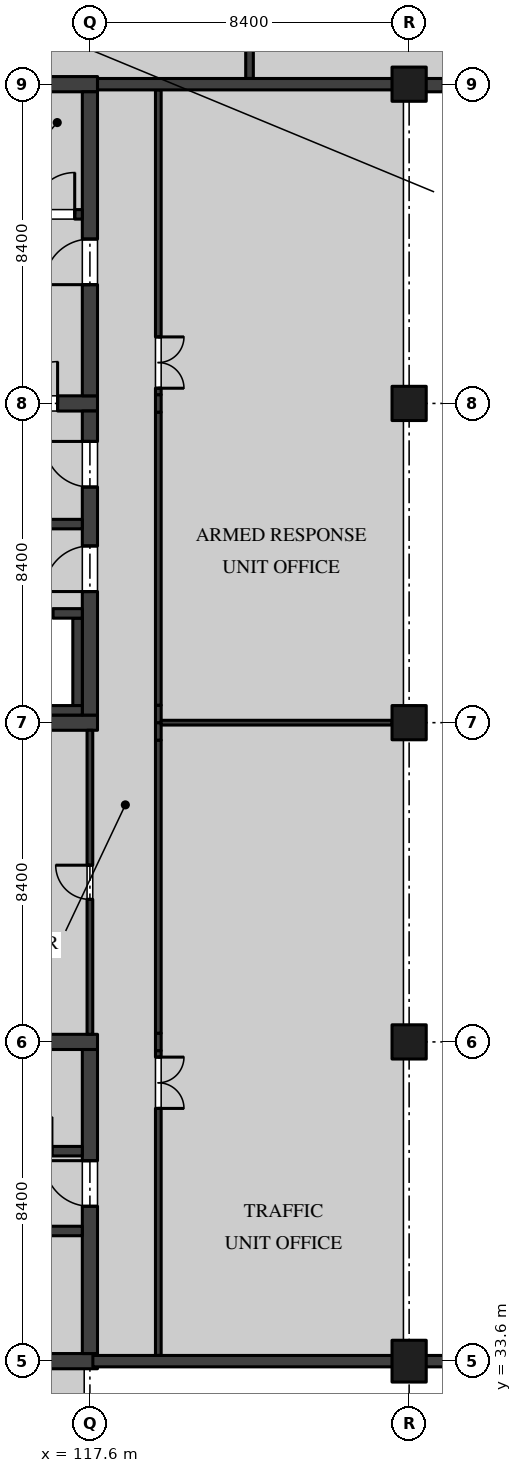
"""IFC4 building model, lengths in metres.
Left out: names, types, materials, properties, quantities, classifications, styles, units other than length and angle.
Written with IfcOpenShell. Run it as: python <this file> out.ifc"""

import sys

from ifc_helpers import new_model, si_unit, direction, frame, frame_2d, origin, origin_2d, place, context, subcontext, project, spatial, polyline, rectangle, outline, extrude, element, fill, save


model = new_model("IFC4")
c1 = context("Model", 3, precision=1e-05, world=origin(), true_north=direction((0.0, 1.0)))
c2 = subcontext(c1, "Body", "Model", "MODEL_VIEW")
j1 = project(units=[si_unit("LENGTHUNIT", "METRE"), si_unit("PLANEANGLEUNIT", "RADIAN")], contexts=[c1])
p1 = place(None, origin())
s1 = spatial("IfcSite", under=j1, at=p1, CompositionType="ELEMENT")
p2 = place(p1, origin())
s2 = spatial("IfcBuilding", under=s1, at=p2, CompositionType="ELEMENT")
p3 = place(p2, frame((0.0, 0.0, 5.4)))
s3 = spatial("IfcBuildingStorey", under=s2, at=p3, CompositionType="ELEMENT", Elevation=5.4)
p4 = place(p3, frame((126.0, 33.6, 0.0), z_axis=(0.0, 0.0, 1.0), x_axis=(1.0, 0.0, 0.0)))
e1 = element("IfcColumn", 1, at=p4, inside=s3, PredefinedType="COLUMN", context=c2, shape_type="SweptSolid", body=[
    extrude(rectangle(XDim=0.9, YDim=1.1, at=origin_2d()), origin(), (0.0, 0.0, 1.0), 4.37),
])
for number, where, z_axis, x_axis in (
    (2, (126.0, 42.0, 0.0), (0.0, 0.0, 1.0), (1.0, 0.0, 0.0)),
    (3, (126.0, 50.4, 0.0), (0.0, 0.0, 1.0), (1.0, 0.0, 0.0)),
    (4, (126.0, 58.8, 0.0), (0.0, 0.0, 1.0), (1.0, 0.0, 0.0)),
    (5, (126.0, 67.2, 0.0), (0.0, 0.0, 1.0), (1.0, 0.0, 0.0)),
):
    element("IfcColumn", number, at=place(p3, frame(where, z_axis=z_axis, x_axis=x_axis)), inside=s3, PredefinedType="COLUMN", context=c2, shape_type="SweptSolid", body=[
        extrude(rectangle(XDim=0.9, YDim=0.9, at=origin_2d()), origin(), (0.0, 0.0, 1.0), 4.37),
    ])
p5 = place(p3, frame((109.0, 50.4, 0.0), z_axis=(0.0, 0.0, 1.0), x_axis=(1.0, 0.0, 0.0)))
e6 = element("IfcWall", 6, at=p5, inside=s3, PredefinedType="SHEAR", context=c2, shape_type="SweptSolid", body=[
    extrude(rectangle(XDim=8.8, YDim=0.4, at=frame_2d((4.4, 0.0))), origin(), (0.0, 0.0, 1.0), 4.37),
])
p6 = place(p3, frame((109.0, 58.8, 0.0), z_axis=(0.0, 0.0, 1.0), x_axis=(1.0, 0.0, 0.0)))
e7 = element("IfcWall", 7, at=p6, inside=s3, PredefinedType="SHEAR", context=c2, shape_type="SweptSolid", body=[
    extrude(rectangle(XDim=8.8, YDim=0.4, at=frame_2d((4.4, 0.0))), origin(), (0.0, 0.0, 1.0), 4.37),
])
p7 = place(p6, frame((6.65, 0.0, 0.0)))
e8 = element("IfcOpeningElement", 8, at=p7, cuts=e7, PredefinedType="OPENING", context=c2, shape_type="SweptSolid", body=[
    extrude(rectangle(XDim=1.1, YDim=2.1, at=frame_2d((0.55, 1.05))), frame((0.0, 0.21, 0.0), z_axis=(0.0, -1.0, 0.0), x_axis=(1.0, 0.0, 0.0)), (0.0, 0.0, 1.0), 0.42),
])
p8 = place(p3, frame((117.6, 50.6, 0.0), z_axis=(0.0, 0.0, 1.0), x_axis=(0.0, 1.0, 0.0)))
e9 = element("IfcWall", 9, at=p8, inside=s3, PredefinedType="SHEAR", context=c2, shape_type="SweptSolid", body=[
    extrude(rectangle(XDim=8.0, YDim=0.4, at=frame_2d((4.0, 0.0))), origin(), (0.0, 0.0, 1.0), 4.37),
])
p9 = place(p8, frame((3.25, 0.0, 0.0)))
e10 = element("IfcOpeningElement", 10, at=p9, cuts=e9, PredefinedType="OPENING", context=c2, shape_type="SweptSolid", body=[
    extrude(rectangle(XDim=1.2, YDim=2.1, at=frame_2d((0.6, 1.05))), frame((0.0, 0.21, 0.0), z_axis=(0.0, -1.0, 0.0), x_axis=(1.0, 0.0, 0.0)), (0.0, 0.0, 1.0), 0.42),
])
p10 = place(p8, frame((6.0, 0.0, 0.0)))
e11 = element("IfcOpeningElement", 11, at=p10, cuts=e9, PredefinedType="OPENING", context=c2, shape_type="SweptSolid", body=[
    extrude(rectangle(XDim=1.2, YDim=2.1, at=frame_2d((0.6, 1.05))), frame((0.0, 0.21, 0.0), z_axis=(0.0, -1.0, 0.0), x_axis=(1.0, 0.0, 0.0)), (0.0, 0.0, 1.0), 0.42),
])
p11 = place(p3, frame((114.75, 55.625, 0.0), z_axis=(0.0, 0.0, 1.0), x_axis=(1.0, 0.0, 0.0)))
e12 = element("IfcWall", 12, at=p11, inside=s3, PredefinedType="SOLIDWALL", context=c2, shape_type="SweptSolid", body=[
    extrude(rectangle(XDim=2.65, YDim=0.25, at=frame_2d((1.325, 0.0))), origin(), (0.0, 0.0, 1.0), 4.37),
])
p12 = place(p3, frame((109.0, 67.2, 0.0), z_axis=(0.0, 0.0, 1.0), x_axis=(1.0, 0.0, 0.0)))
e13 = element("IfcWall", 13, at=p12, inside=s3, PredefinedType="SHEAR", context=c2, shape_type="SweptSolid", body=[
    extrude(rectangle(XDim=8.8, YDim=0.4, at=frame_2d((4.4, 0.0))), origin(), (0.0, 0.0, 1.0), 4.37),
])
p13 = place(p3, frame((117.6, 59.0, 0.0), z_axis=(0.0, 0.0, 1.0), x_axis=(0.0, 1.0, 0.0)))
e14 = element("IfcWall", 14, at=p13, inside=s3, PredefinedType="SHEAR", context=c2, shape_type="SweptSolid", body=[
    extrude(rectangle(XDim=8.0, YDim=0.4, at=frame_2d((4.0, 0.0))), origin(), (0.0, 0.0, 1.0), 4.37),
])
p14 = place(p13, frame((2.925, 0.0, 0.0)))
e15 = element("IfcOpeningElement", 15, at=p14, cuts=e14, PredefinedType="OPENING", context=c2, shape_type="SweptSolid", body=[
    extrude(rectangle(XDim=1.2, YDim=2.1, at=frame_2d((0.6, 1.05))), frame((0.0, 0.21, 0.0), z_axis=(0.0, -1.0, 0.0), x_axis=(1.0, 0.0, 0.0)), (0.0, 0.0, 1.0), 0.42),
])
p15 = place(p3, frame((117.4, 63.775, 0.0), z_axis=(0.0, 0.0, 1.0), x_axis=(-1.0, 0.0, 0.0)))
e16 = element("IfcWall", 16, at=p15, inside=s3, PredefinedType="SOLIDWALL", context=c2, shape_type="SweptSolid", body=[
    extrude(rectangle(XDim=8.0, YDim=0.25, at=frame_2d((4.0, 0.0))), origin(), (0.0, 0.0, 1.0), 4.37),
])
p16 = place(p15, frame((0.2, 0.0, 0.0)))
e17 = element("IfcOpeningElement", 17, at=p16, cuts=e16, PredefinedType="OPENING", context=c2, shape_type="SweptSolid", body=[
    extrude(rectangle(XDim=1.1, YDim=2.1, at=frame_2d((0.55, 1.05))), frame((0.0, 0.135, 0.0), z_axis=(0.0, -1.0, 0.0), x_axis=(1.0, 0.0, 0.0)), (0.0, 0.0, 1.0), 0.27),
])
for number, where, z_axis, x_axis in (
    (18, (109.0, 33.6, 0.0), (0.0, 0.0, 1.0), (1.0, 0.0, 0.0)),
    (19, (109.0, 42.0, 0.0), (0.0, 0.0, 1.0), (1.0, 0.0, 0.0)),
):
    element("IfcWall", number, at=place(p3, frame(where, z_axis=z_axis, x_axis=x_axis)), inside=s3, PredefinedType="SHEAR", context=c2, shape_type="SweptSolid", body=[
        extrude(rectangle(XDim=8.8, YDim=0.4, at=frame_2d((4.4, 0.0))), origin(), (0.0, 0.0, 1.0), 4.37),
    ])
p17 = place(p3, frame((117.6, 33.8, 0.0), z_axis=(0.0, 0.0, 1.0), x_axis=(0.0, 1.0, 0.0)))
e20 = element("IfcWall", 20, at=p17, inside=s3, PredefinedType="SHEAR", context=c2, shape_type="SweptSolid", body=[
    extrude(rectangle(XDim=8.0, YDim=0.4, at=frame_2d((4.0, 0.0))), origin(), (0.0, 0.0, 1.0), 4.37),
])
p18 = place(p17, frame((3.875, 0.0, 0.0)))
e21 = element("IfcOpeningElement", 21, at=p18, cuts=e20, PredefinedType="OPENING", context=c2, shape_type="SweptSolid", body=[
    extrude(rectangle(XDim=1.2, YDim=2.1, at=frame_2d((0.6, 1.05))), frame((0.0, 0.21, 0.0), z_axis=(0.0, -1.0, 0.0), x_axis=(1.0, 0.0, 0.0)), (0.0, 0.0, 1.0), 0.42),
])
p19 = place(p3, frame((109.4, 37.025, 0.0), z_axis=(0.0, 0.0, 1.0), x_axis=(1.0, 0.0, 0.0)))
e22 = element("IfcWall", 22, at=p19, inside=s3, PredefinedType="SOLIDWALL", context=c2, shape_type="SweptSolid", body=[
    extrude(rectangle(XDim=8.0, YDim=0.25, at=frame_2d((4.0, 0.0))), origin(), (0.0, 0.0, 1.0), 4.37),
])
p20 = place(p19, frame((0.2, 0.0, 0.0)))
e23 = element("IfcOpeningElement", 23, at=p20, cuts=e22, PredefinedType="OPENING", context=c2, shape_type="SweptSolid", body=[
    extrude(rectangle(XDim=1.1, YDim=2.1, at=frame_2d((0.55, 1.05))), frame((0.0, 0.135, 0.0), z_axis=(0.0, -1.0, 0.0), x_axis=(1.0, 0.0, 0.0)), (0.0, 0.0, 1.0), 0.27),
])
p21 = place(p3, frame((112.05, 39.125, 0.0), z_axis=(0.0, 0.0, 1.0), x_axis=(1.0, 0.0, 0.0)))
e24 = element("IfcWall", 24, at=p21, inside=s3, PredefinedType="SOLIDWALL", context=c2, shape_type="SweptSolid", body=[
    extrude(rectangle(XDim=5.35, YDim=0.25, at=frame_2d((2.675, 0.0))), origin(), (0.0, 0.0, 1.0), 4.37),
])
p22 = place(p21, frame((3.65, 0.0, 0.0)))
e25 = element("IfcOpeningElement", 25, at=p22, cuts=e24, PredefinedType="OPENING", context=c2, shape_type="SweptSolid", body=[
    extrude(rectangle(XDim=0.9, YDim=2.1, at=frame_2d((0.45, 1.05))), frame((0.0, 0.135, 0.0), z_axis=(0.0, -1.0, 0.0), x_axis=(1.0, 0.0, 0.0)), (0.0, 0.0, 1.0), 0.27),
])
p23 = place(p21, frame((0.9, 0.0, 0.0)))
e26 = element("IfcOpeningElement", 26, at=p23, cuts=e24, PredefinedType="OPENING", context=c2, shape_type="SweptSolid", body=[
    extrude(rectangle(XDim=0.8, YDim=2.1, at=frame_2d((0.4, 1.05))), frame((0.0, 0.135, 0.0), z_axis=(0.0, -1.0, 0.0), x_axis=(1.0, 0.0, 0.0)), (0.0, 0.0, 1.0), 0.27),
])
p24 = place(p3, frame((117.275, 50.85, 0.0), z_axis=(0.0, 0.0, 1.0), x_axis=(0.0, 1.0, 0.0)))
e27 = element("IfcWall", 27, at=p24, inside=s3, PredefinedType="SOLIDWALL", context=c2, shape_type="SweptSolid", body=[
    extrude(rectangle(XDim=2.3, YDim=0.25, at=frame_2d((1.15, 0.0))), origin(), (0.0, 0.0, 1.0), 4.37),
])
p25 = place(p3, frame((114.75, 53.275, 0.0), z_axis=(0.0, 0.0, 1.0), x_axis=(1.0, 0.0, 0.0)))
e28 = element("IfcWall", 28, at=p25, inside=s3, PredefinedType="SOLIDWALL", context=c2, shape_type="SweptSolid", body=[
    extrude(rectangle(XDim=2.65, YDim=0.25, at=frame_2d((1.325, 0.0))), origin(), (0.0, 0.0, 1.0), 4.37),
])
p26 = place(p25, frame((0.775, 0.0, 0.0)))
e29 = element("IfcOpeningElement", 29, at=p26, cuts=e28, PredefinedType="OPENING", context=c2, shape_type="SweptSolid", body=[
    extrude(rectangle(XDim=1.1, YDim=2.1, at=frame_2d((0.55, 1.05))), frame((0.0, 0.135, 0.0), z_axis=(0.0, -1.0, 0.0), x_axis=(1.0, 0.0, 0.0)), (0.0, 0.0, 1.0), 0.27),
])
p27 = place(p3, frame((114.75, 50.725, 0.0), z_axis=(0.0, 0.0, 1.0), x_axis=(1.0, 0.0, 0.0)))
e30 = element("IfcWall", 30, at=p27, inside=s3, PredefinedType="SOLIDWALL", context=c2, shape_type="SweptSolid", body=[
    extrude(rectangle(XDim=2.65, YDim=0.25, at=frame_2d((1.325, 0.0))), origin(), (0.0, 0.0, 1.0), 4.37),
])
p28 = place(p2, origin())
s4 = spatial("IfcBuildingStorey", under=s2, at=p28, CompositionType="ELEMENT", Elevation=0.0)
p29 = place(p28, frame((117.6, 25.65, 0.0), z_axis=(0.0, 0.0, 1.0), x_axis=(0.0, 1.0, 0.0)))
e31 = element("IfcWall", 31, at=p29, inside=s4, PredefinedType="PARTITIONING", context=c2, shape_type="SweptSolid", body=[
    extrude(rectangle(XDim=7.75, YDim=0.25, at=frame_2d((3.875, 0.0))), origin(), (0.0, 0.0, 1.0), 8.375),
])
p30 = place(p3, frame((119.4, 33.75, 0.0), z_axis=(0.0, 0.0, 1.0), x_axis=(0.0, 1.0, 0.0)))
e32 = element("IfcWall", 32, at=p30, inside=s3, PredefinedType="PARTITIONING", context=c2, shape_type="SweptSolid", body=[
    extrude(rectangle(XDim=8.02, YDim=0.15, at=frame_2d((4.01, 0.0))), origin(), (0.0, 0.0, 1.0), 4.37),
])
p31 = place(p30, frame((6.5, 0.0, 0.0)))
e33 = element("IfcOpeningElement", 33, at=p31, cuts=e32, PredefinedType="OPENING", context=c2, shape_type="SweptSolid", body=[
    extrude(rectangle(XDim=1.35, YDim=2.1, at=frame_2d((0.675, 1.05))), frame((0.0, 0.085, 0.0), z_axis=(0.0, -1.0, 0.0), x_axis=(1.0, 0.0, 0.0)), (0.0, 0.0, 1.0), 0.17),
])
p32 = place(p3, frame((119.4, 41.77, 0.0), z_axis=(0.0, 0.0, 1.0), x_axis=(0.0, 1.0, 0.0)))
e34 = element("IfcWall", 34, at=p32, inside=s3, PredefinedType="PARTITIONING", context=c2, shape_type="SweptSolid", body=[
    extrude(rectangle(XDim=0.46, YDim=0.15, at=frame_2d((0.23, 0.0))), origin(), (0.0, 0.0, 1.0), 3.746),
])
p33 = place(p3, frame((119.4, 42.23, 0.0), z_axis=(0.0, 0.0, 1.0), x_axis=(0.0, 1.0, 0.0)))
e35 = element("IfcWall", 35, at=p33, inside=s3, PredefinedType="PARTITIONING", context=c2, shape_type="SweptSolid", body=[
    extrude(rectangle(XDim=7.71, YDim=0.15, at=frame_2d((3.855, 0.0))), origin(), (0.0, 0.0, 1.0), 4.37),
])
p34 = place(p3, frame((119.4, 49.94, 0.0), z_axis=(0.0, 0.0, 1.0), x_axis=(0.0, 1.0, 0.0)))
e36 = element("IfcWall", 36, at=p34, inside=s3, PredefinedType="PARTITIONING", context=c2, shape_type="SweptSolid", body=[
    extrude(rectangle(XDim=0.46, YDim=0.15, at=frame_2d((0.23, 0.0))), origin(), (0.0, 0.0, 1.0), 3.746),
])
p35 = place(p3, frame((119.4, 50.4, 0.0), z_axis=(0.0, 0.0, 1.0), x_axis=(0.0, 1.0, 0.0)))
e37 = element("IfcWall", 37, at=p35, inside=s3, PredefinedType="PARTITIONING", context=c2, shape_type="SweptSolid", body=[
    extrude(rectangle(XDim=0.46, YDim=0.15, at=frame_2d((0.23, 0.0))), origin(), (0.0, 0.0, 1.0), 3.746),
])
p36 = place(p3, frame((119.4, 50.86, 0.0), z_axis=(0.0, 0.0, 1.0), x_axis=(0.0, 1.0, 0.0)))
e38 = element("IfcWall", 38, at=p36, inside=s3, PredefinedType="PARTITIONING", context=c2, shape_type="SweptSolid", body=[
    extrude(rectangle(XDim=7.71, YDim=0.15, at=frame_2d((3.855, 0.0))), origin(), (0.0, 0.0, 1.0), 4.37),
])
p37 = place(p3, frame((119.4, 58.57, 0.0), z_axis=(0.0, 0.0, 1.0), x_axis=(0.0, 1.0, 0.0)))
e39 = element("IfcWall", 39, at=p37, inside=s3, PredefinedType="PARTITIONING", context=c2, shape_type="SweptSolid", body=[
    extrude(rectangle(XDim=0.46, YDim=0.15, at=frame_2d((0.23, 0.0))), origin(), (0.0, 0.0, 1.0), 3.746),
])
p38 = place(p3, frame((119.4, 59.03, 0.0), z_axis=(0.0, 0.0, 1.0), x_axis=(0.0, 1.0, 0.0)))
e40 = element("IfcWall", 40, at=p38, inside=s3, PredefinedType="PARTITIONING", context=c2, shape_type="SweptSolid", body=[
    extrude(rectangle(XDim=8.02, YDim=0.15, at=frame_2d((4.01, 0.0))), origin(), (0.0, 0.0, 1.0), 4.37),
])
p39 = place(p38, frame((0.17, 0.0, 0.0)))
e41 = element("IfcOpeningElement", 41, at=p39, cuts=e40, PredefinedType="OPENING", context=c2, shape_type="SweptSolid", body=[
    extrude(rectangle(XDim=1.35, YDim=2.1, at=frame_2d((0.675, 1.05))), frame((0.0, 0.085, 0.0), z_axis=(0.0, -1.0, 0.0), x_axis=(1.0, 0.0, 0.0)), (0.0, 0.0, 1.0), 0.17),
])
p40 = place(p3, frame((117.6, 42.2, 0.0), z_axis=(0.0, 0.0, 1.0), x_axis=(0.0, 1.0, 0.0)))
e42 = element("IfcWall", 42, at=p40, inside=s3, PredefinedType="PARTITIONING", context=c2, shape_type="SweptSolid", body=[
    extrude(rectangle(XDim=8.0, YDim=0.15, at=frame_2d((4.0, 0.0))), origin(), (0.0, 0.0, 1.0), 3.746),
])
p41 = place(p40, frame((3.55, 0.0, 0.0)))
e43 = element("IfcOpeningElement", 43, at=p41, cuts=e42, PredefinedType="OPENING", context=c2, shape_type="SweptSolid", body=[
    extrude(rectangle(XDim=0.9, YDim=2.1, at=frame_2d((0.45, 1.05))), frame((0.0, 0.085, 0.0), z_axis=(0.0, -1.0, 0.0), x_axis=(1.0, 0.0, 0.0)), (0.0, 0.0, 1.0), 0.17),
])
p42 = place(p3, frame((119.475, 50.4, 0.0), z_axis=(0.0, 0.0, 1.0), x_axis=(1.0, 0.0, 0.0)))
e44 = element("IfcWall", 44, at=p42, inside=s3, PredefinedType="PARTITIONING", context=c2, shape_type="SweptSolid", body=[
    extrude(rectangle(XDim=6.075, YDim=0.125, at=frame_2d((3.038, 0.0))), origin(), (0.0, 0.0, 1.0), 3.746),
])
p43 = place(p3, frame((121.8, 67.35, 0.0), z_axis=(0.0, 0.0, 1.0), x_axis=(0.0, 1.0, 0.0)))
e45 = element("IfcWall", 45, at=p43, inside=s3, PredefinedType="PARTITIONING", context=c2, shape_type="SweptSolid", body=[
    extrude(rectangle(XDim=6.65, YDim=0.2, at=frame_2d((3.325, 0.0))), origin(), (0.0, 0.0, 1.0), 4.37),
])
p44 = place(p3, frame((134.1, 33.6, 0.0), z_axis=(0.0, 0.0, 1.0), x_axis=(-1.0, 0.0, 0.0)))
e46 = element("IfcWall", 46, at=p44, inside=s3, PredefinedType="SOLIDWALL", context=c2, shape_type="SweptSolid", body=[
    extrude(outline(polyline([(0.0, 0.0), (7.67, 0.0), (7.67, 3.6), (7.65, 3.6), (0.0, 3.6), (0.0, 0.0)])), frame((0.0, 0.15, 0.0), z_axis=(0.0, -1.0, 0.0), x_axis=(1.0, 0.0, 0.0)), (0.0, 0.0, 1.0), 0.3),
])
p45 = place(p3, frame((117.678, 33.6, 0.0), z_axis=(0.0, 0.0, 1.0), x_axis=(1.0, 0.0, 0.0)))
e47 = element("IfcWall", 47, at=p45, inside=s3, PredefinedType="SOLIDWALL", context=c2, shape_type="SweptSolid", body=[
    extrude(outline(polyline([(0.0, 0.0), (7.892, 0.0), (7.892, 3.6), (7.872, 3.6), (0.122, 3.6), (0.0, 3.6), (0.0, 0.0)])), frame((0.0, 0.15, 0.0), z_axis=(0.0, -1.0, 0.0), x_axis=(1.0, 0.0, 0.0)), (0.0, 0.0, 1.0), 0.3),
])
p46 = place(p3, frame((126.43, 67.175, 0.0), z_axis=(0.0, 0.0, 1.0), x_axis=(1.0, 0.0, 0.0)))
e48 = element("IfcWall", 48, at=p46, inside=s3, PredefinedType="SOLIDWALL", context=c2, shape_type="SweptSolid", body=[
    extrude(rectangle(XDim=7.59, YDim=0.35, at=frame_2d((3.795, 0.0))), origin(), (0.0, 0.0, 1.0), 3.746),
])
p47 = place(p46, frame((0.47, 0.0, 1.5)))
e49 = element("IfcOpeningElement", 49, at=p47, cuts=e48, PredefinedType="OPENING", context=c2, shape_type="SweptSolid", body=[
    extrude(rectangle(XDim=0.3, YDim=1.5, at=frame_2d((0.15, 0.75))), frame((0.0, 0.185, 0.0), z_axis=(0.0, -1.0, 0.0), x_axis=(1.0, 0.0, 0.0)), (0.0, 0.0, 1.0), 0.37),
])
p48 = place(p46, frame((2.12, 0.0, 1.5)))
e50 = element("IfcOpeningElement", 50, at=p48, cuts=e48, PredefinedType="OPENING", context=c2, shape_type="SweptSolid", body=[
    extrude(rectangle(XDim=1.2, YDim=1.5, at=frame_2d((0.6, 0.75))), frame((0.0, 0.185, 0.0), z_axis=(0.0, -1.0, 0.0), x_axis=(1.0, 0.0, 0.0)), (0.0, 0.0, 1.0), 0.37),
])
p49 = place(p46, frame((4.07, 0.0, 1.5)))
e51 = element("IfcOpeningElement", 51, at=p49, cuts=e48, PredefinedType="OPENING", context=c2, shape_type="SweptSolid", body=[
    extrude(rectangle(XDim=1.5, YDim=1.5, at=frame_2d((0.75, 0.75))), frame((0.0, 0.185, 0.0), z_axis=(0.0, -1.0, 0.0), x_axis=(1.0, 0.0, 0.0)), (0.0, 0.0, 1.0), 0.37),
])
p50 = place(p3, frame((125.57, 67.2, 0.0), z_axis=(0.0, 0.0, 1.0), x_axis=(-1.0, 0.0, 0.0)))
e52 = element("IfcWall", 52, at=p50, inside=s3, PredefinedType="SOLIDWALL", context=c2, shape_type="SweptSolid", body=[
    extrude(rectangle(XDim=7.77, YDim=0.3, at=frame_2d((3.885, 0.0))), origin(), (0.0, 0.0, 1.0), 3.746),
])
p51 = place(p9, origin())
e53 = element("IfcDoor", 53, at=p51, inside=s3, OperationType="SINGLE_SWING_RIGHT", PredefinedType="DOOR", context=c2, shape_type="SweptSolid", body=[
    extrude(rectangle(XDim=1.2, YDim=2.1, at=frame_2d((0.6, 1.05))), frame((0.0, 0.035, 0.0), z_axis=(0.0, -1.0, 0.0), x_axis=(1.0, 0.0, 0.0)), (0.0, 0.0, 1.0), 0.07),
])
fill(e10, e53)
p52 = place(p10, origin())
e54 = element("IfcDoor", 54, at=p52, inside=s3, OperationType="SINGLE_SWING_LEFT", PredefinedType="DOOR", context=c2, shape_type="SweptSolid", body=[
    extrude(rectangle(XDim=1.2, YDim=2.1, at=frame_2d((0.6, 1.05))), frame((0.0, 0.035, 0.0), z_axis=(0.0, -1.0, 0.0), x_axis=(1.0, 0.0, 0.0)), (0.0, 0.0, 1.0), 0.07),
])
fill(e11, e54)
p53 = place(p7, origin())
e55 = element("IfcDoor", 55, at=p53, inside=s3, OperationType="SINGLE_SWING_LEFT", PredefinedType="DOOR", context=c2, shape_type="SweptSolid", body=[
    extrude(rectangle(XDim=1.1, YDim=2.1, at=frame_2d((0.55, 1.05))), frame((0.0, 0.035, 0.0), z_axis=(0.0, -1.0, 0.0), x_axis=(1.0, 0.0, 0.0)), (0.0, 0.0, 1.0), 0.07),
])
fill(e8, e55)
p54 = place(p14, origin())
e56 = element("IfcDoor", 56, at=p54, inside=s3, OperationType="SINGLE_SWING_RIGHT", PredefinedType="DOOR", context=c2, shape_type="SweptSolid", body=[
    extrude(rectangle(XDim=1.2, YDim=2.1, at=frame_2d((0.6, 1.05))), frame((0.0, 0.035, 0.0), z_axis=(0.0, -1.0, 0.0), x_axis=(1.0, 0.0, 0.0)), (0.0, 0.0, 1.0), 0.07),
])
fill(e15, e56)
p55 = place(p16, frame((1.1, 0.0, 0.0), z_axis=(0.0, 0.0, 1.0), x_axis=(-1.0, 0.0, 0.0)))
e57 = element("IfcDoor", 57, at=p55, inside=s3, OperationType="SINGLE_SWING_LEFT", PredefinedType="DOOR", context=c2, shape_type="SweptSolid", body=[
    extrude(rectangle(XDim=1.1, YDim=2.1, at=frame_2d((0.55, 1.05))), frame((0.0, 0.035, 0.0), z_axis=(0.0, -1.0, 0.0), x_axis=(1.0, 0.0, 0.0)), (0.0, 0.0, 1.0), 0.07),
])
fill(e17, e57)
p56 = place(p18, origin())
e58 = element("IfcDoor", 58, at=p56, inside=s3, OperationType="SINGLE_SWING_LEFT", PredefinedType="DOOR", context=c2, shape_type="SweptSolid", body=[
    extrude(rectangle(XDim=1.2, YDim=2.1, at=frame_2d((0.6, 1.05))), frame((0.0, 0.035, 0.0), z_axis=(0.0, -1.0, 0.0), x_axis=(1.0, 0.0, 0.0)), (0.0, 0.0, 1.0), 0.07),
])
fill(e21, e58)
p57 = place(p26, origin())
e59 = element("IfcDoor", 59, at=p57, inside=s3, OperationType="DOUBLE_DOOR_SLIDING", PredefinedType="DOOR", context=c2, shape_type="SweptSolid", body=[
    extrude(rectangle(XDim=1.1, YDim=2.1, at=frame_2d((0.55, 1.05))), frame((0.0, 0.04, 0.0), z_axis=(0.0, -1.0, 0.0), x_axis=(1.0, 0.0, 0.0)), (0.0, 0.0, 1.0), 0.08),
])
fill(e29, e59)
p58 = place(p31, frame((1.35, 0.0, 0.0), z_axis=(0.0, 0.0, 1.0), x_axis=(-1.0, 0.0, 0.0)))
e60 = element("IfcDoor", 60, at=p58, inside=s3, OperationType="DOUBLE_DOOR_SINGLE_SWING", PredefinedType="DOOR", context=c2, shape_type="SweptSolid", body=[
    extrude(rectangle(XDim=1.35, YDim=2.1, at=frame_2d((0.675, 1.05))), frame((0.0, 0.025, 0.0), z_axis=(0.0, -1.0, 0.0), x_axis=(1.0, 0.0, 0.0)), (0.0, 0.0, 1.0), 0.05),
])
fill(e33, e60)
p59 = place(p39, frame((1.35, 0.0, 0.0), z_axis=(0.0, 0.0, 1.0), x_axis=(-1.0, 0.0, 0.0)))
e61 = element("IfcDoor", 61, at=p59, inside=s3, OperationType="DOUBLE_DOOR_SINGLE_SWING", PredefinedType="DOOR", context=c2, shape_type="SweptSolid", body=[
    extrude(rectangle(XDim=1.35, YDim=2.1, at=frame_2d((0.675, 1.05))), frame((0.0, 0.025, 0.0), z_axis=(0.0, -1.0, 0.0), x_axis=(1.0, 0.0, 0.0)), (0.0, 0.0, 1.0), 0.05),
])
fill(e41, e61)
p60 = place(p41, origin())
e62 = element("IfcDoor", 62, at=p60, inside=s3, OperationType="SINGLE_SWING_LEFT", PredefinedType="DOOR", context=c2, shape_type="SweptSolid", body=[
    extrude(rectangle(XDim=0.9, YDim=2.1, at=frame_2d((0.45, 1.05))), frame((0.0, 0.025, 0.0), z_axis=(0.0, -1.0, 0.0), x_axis=(1.0, 0.0, 0.0)), (0.0, 0.0, 1.0), 0.05),
])
fill(e43, e62)
save(model, sys.argv[1])
